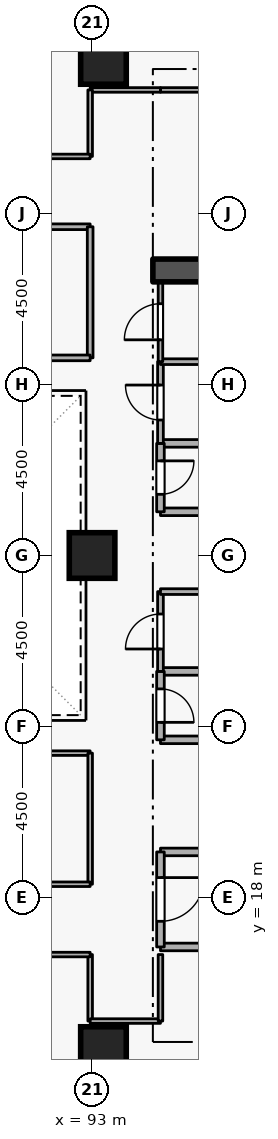
"""IFC4 building model, lengths in metres.
Left out: names, types, materials, properties, quantities, classifications, styles, units other than length and angle.
Written with IfcOpenShell. Run it as: python <this file> out.ifc"""

import sys

from ifc_helpers import new_model, si_unit, direction, frame, frame_2d, origin, origin_2d, place, context, subcontext, project, spatial, rectangle, extrude, element, fill, save


model = new_model("IFC4")
c1 = context("Model", 3, precision=1e-05, world=origin(), true_north=direction((0.0, 1.0)))
c2 = subcontext(c1, "Body", "Model", "MODEL_VIEW")
j1 = project(units=[si_unit("LENGTHUNIT", "METRE"), si_unit("PLANEANGLEUNIT", "RADIAN")], contexts=[c1])
p1 = place(None, origin())
s1 = spatial("IfcSite", under=j1, at=p1, CompositionType="ELEMENT")
p2 = place(p1, origin())
s2 = spatial("IfcBuilding", under=s1, at=p2, CompositionType="ELEMENT")
p3 = place(p2, frame((0.0, 0.0, 112.5)))
s3 = spatial("IfcBuildingStorey", under=s2, at=p3, CompositionType="ELEMENT", Elevation=112.5)
p4 = place(p3, frame((94.6, 34.5, 0.0), z_axis=(0.0, 0.0, 1.0), x_axis=(1.0, 0.0, 0.0)))
e1 = element("IfcWall", 1, at=p4, inside=s3, PredefinedType="SHEAR", context=c2, shape_type="SweptSolid", body=[
    extrude(rectangle(XDim=5.7, YDim=0.6, at=frame_2d((2.85, 0.0))), origin(), (0.0, 0.0, 1.0), 3.6),
])
for number, where, z_axis, x_axis in (
    (2, (93.3, 14.0, 0.0), (0.0, 0.0, 1.0), (1.0, 0.0, 0.0)),
    (3, (93.3, 40.0, 0.0), (0.0, 0.0, 1.0), (1.0, 0.0, 0.0)),
    (4, (93.0, 27.0, 0.0), (0.0, 0.0, 1.0), (1.0, 0.0, 0.0)),
):
    element("IfcColumn", number, at=place(p3, frame(where, z_axis=z_axis, x_axis=x_axis)), inside=s3, PredefinedType="COLUMN", context=c2, shape_type="SweptSolid", body=[
        extrude(rectangle(XDim=1.2, YDim=1.2, at=origin_2d()), origin(), (0.0, 0.0, 1.0), 3.6),
    ])
p5 = place(p3, frame((94.8, 16.7, 0.0), z_axis=(0.0, 0.0, 1.0), x_axis=(1.0, 0.0, 0.0)))
e5 = element("IfcWall", 5, at=p5, inside=s3, PredefinedType="STANDARD", context=c2, shape_type="SweptSolid", body=[
    extrude(rectangle(XDim=5.7, YDim=0.2, at=frame_2d((2.85, 0.0))), origin(), (0.0, 0.0, 1.0), 3.34),
])
p6 = place(p3, frame((97.1, 19.2, 0.0), z_axis=(0.0, 0.0, 1.0), x_axis=(-1.0, 0.0, 0.0)))
e6 = element("IfcWall", 6, at=p6, inside=s3, PredefinedType="STANDARD", context=c2, shape_type="SweptSolid", body=[
    extrude(rectangle(XDim=2.3, YDim=0.2, at=frame_2d((1.15, 0.0))), origin(), (0.0, 0.0, 1.0), 2.545),
])
p7 = place(p3, frame((94.8, 19.2, 0.0), z_axis=(0.0, 0.0, 1.0), x_axis=(0.0, -1.0, 0.0)))
e7 = element("IfcWall", 7, at=p7, inside=s3, PredefinedType="STANDARD", context=c2, shape_type="SweptSolid", body=[
    extrude(rectangle(XDim=2.5, YDim=0.2, at=frame_2d((1.25, 0.0))), origin(), (0.0, 0.0, 1.0), 3.34),
])
p8 = place(p7, frame((0.675, 0.0, 0.0)))
e8 = element("IfcOpeningElement", 8, at=p8, cuts=e7, PredefinedType="OPENING", context=c2, shape_type="SweptSolid", body=[
    extrude(rectangle(XDim=1.15, YDim=2.1, at=frame_2d((0.575, 1.05))), frame((0.0, 0.11, 0.0), z_axis=(0.0, -1.0, 0.0), x_axis=(1.0, 0.0, 0.0)), (0.0, 0.0, 1.0), 0.22),
])
for number, where, z_axis, x_axis in (
    (9, (94.8, 28.15, 0.0), (0.0, 0.0, 1.0), (1.0, 0.0, 0.0)),
    (10, (96.85, 29.95, 0.0), (0.0, 0.0, 1.0), (-1.0, 0.0, 0.0)),
):
    element("IfcWall", number, at=place(p3, frame(where, z_axis=z_axis, x_axis=x_axis)), inside=s3, PredefinedType="STANDARD", context=c2, shape_type="SweptSolid", body=[
        extrude(rectangle(XDim=2.05, YDim=0.2, at=frame_2d((1.025, 0.0))), origin(), (0.0, 0.0, 1.0), 3.34),
    ])
p9 = place(p3, frame((94.8, 29.95, 0.0), z_axis=(0.0, 0.0, 1.0), x_axis=(0.0, -1.0, 0.0)))
e11 = element("IfcWall", 11, at=p9, inside=s3, PredefinedType="STANDARD", context=c2, shape_type="SweptSolid", body=[
    extrude(rectangle(XDim=1.8, YDim=0.2, at=frame_2d((0.9, 0.0))), origin(), (0.0, 0.0, 1.0), 3.34),
])
p10 = place(p9, frame((0.46, 0.0, 0.0)))
e12 = element("IfcOpeningElement", 12, at=p10, cuts=e11, PredefinedType="OPENING", context=c2, shape_type="SweptSolid", body=[
    extrude(rectangle(XDim=0.88, YDim=2.04, at=frame_2d((0.44, 1.02))), frame((0.0, 0.11, 0.0), z_axis=(0.0, -1.0, 0.0), x_axis=(1.0, 0.0, 0.0)), (0.0, 0.0, 1.0), 0.22),
])
for number, where, z_axis, x_axis in (
    (13, (94.8, 22.15, 0.0), (0.0, 0.0, 1.0), (1.0, 0.0, 0.0)),
    (14, (96.85, 23.95, 0.0), (0.0, 0.0, 1.0), (-1.0, 0.0, 0.0)),
):
    element("IfcWall", number, at=place(p3, frame(where, z_axis=z_axis, x_axis=x_axis)), inside=s3, PredefinedType="STANDARD", context=c2, shape_type="SweptSolid", body=[
        extrude(rectangle(XDim=2.05, YDim=0.2, at=frame_2d((1.025, 0.0))), origin(), (0.0, 0.0, 1.0), 3.34),
    ])
p11 = place(p3, frame((94.8, 23.95, 0.0), z_axis=(0.0, 0.0, 1.0), x_axis=(0.0, -1.0, 0.0)))
e15 = element("IfcWall", 15, at=p11, inside=s3, PredefinedType="STANDARD", context=c2, shape_type="SweptSolid", body=[
    extrude(rectangle(XDim=1.8, YDim=0.2, at=frame_2d((0.9, 0.0))), origin(), (0.0, 0.0, 1.0), 3.34),
])
p12 = place(p11, frame((0.46, 0.0, 0.0)))
e16 = element("IfcOpeningElement", 16, at=p12, cuts=e15, PredefinedType="OPENING", context=c2, shape_type="SweptSolid", body=[
    extrude(rectangle(XDim=0.88, YDim=2.04, at=frame_2d((0.44, 1.02))), frame((0.0, 0.11, 0.0), z_axis=(0.0, -1.0, 0.0), x_axis=(1.0, 0.0, 0.0)), (0.0, 0.0, 1.0), 0.22),
])
p13 = place(p3, frame((94.8, 23.95, 0.0), z_axis=(0.0, 0.0, 1.0), x_axis=(0.0, 1.0, 0.0)))
e17 = element("IfcWall", 17, at=p13, inside=s3, PredefinedType="PARTITIONING", context=c2, shape_type="SweptSolid", body=[
    extrude(rectangle(XDim=2.1, YDim=0.15, at=frame_2d((1.05, 0.0))), origin(), (0.0, 0.0, 1.0), 3.34),
])
p14 = place(p13, frame((0.59, 0.0, 0.0)))
e18 = element("IfcOpeningElement", 18, at=p14, cuts=e17, PredefinedType="OPENING", context=c2, shape_type="SweptSolid", body=[
    extrude(rectangle(XDim=0.92, YDim=2.08, at=frame_2d((0.46, 1.04))), frame((0.0, 0.085, 0.0), z_axis=(0.0, -1.0, 0.0), x_axis=(1.0, 0.0, 0.0)), (0.0, 0.0, 1.0), 0.17),
])
p15 = place(p3, frame((94.8, 26.05, 0.0), z_axis=(0.0, 0.0, 1.0), x_axis=(1.0, 0.0, 0.0)))
e19 = element("IfcWall", 19, at=p15, inside=s3, PredefinedType="PARTITIONING", context=c2, shape_type="SweptSolid", body=[
    extrude(rectangle(XDim=2.05, YDim=0.15, at=frame_2d((1.025, 0.0))), origin(), (0.0, 0.0, 1.0), 3.34),
])
p16 = place(p3, frame((94.8, 29.95, 0.0), z_axis=(0.0, 0.0, 1.0), x_axis=(0.0, 1.0, 0.0)))
e20 = element("IfcWall", 20, at=p16, inside=s3, PredefinedType="PARTITIONING", context=c2, shape_type="SweptSolid", body=[
    extrude(rectangle(XDim=2.15, YDim=0.15, at=frame_2d((1.075, 0.0))), origin(), (0.0, 0.0, 1.0), 3.34),
])
p17 = place(p16, frame((0.615, 0.0, 0.0)))
e21 = element("IfcOpeningElement", 21, at=p17, cuts=e20, PredefinedType="OPENING", context=c2, shape_type="SweptSolid", body=[
    extrude(rectangle(XDim=0.92, YDim=2.08, at=frame_2d((0.46, 1.04))), frame((0.0, 0.085, 0.0), z_axis=(0.0, -1.0, 0.0), x_axis=(1.0, 0.0, 0.0)), (0.0, 0.0, 1.0), 0.17),
])
p18 = place(p3, frame((94.8, 32.1, 0.0), z_axis=(0.0, 0.0, 1.0), x_axis=(1.0, 0.0, 0.0)))
e22 = element("IfcWall", 22, at=p18, inside=s3, PredefinedType="PARTITIONING", context=c2, shape_type="SweptSolid", body=[
    extrude(rectangle(XDim=2.05, YDim=0.15, at=frame_2d((1.025, 0.0))), origin(), (0.0, 0.0, 1.0), 3.34),
])
p19 = place(p3, frame((94.8, 32.1, 0.0), z_axis=(0.0, 0.0, 1.0), x_axis=(0.0, 1.0, 0.0)))
e23 = element("IfcWall", 23, at=p19, inside=s3, PredefinedType="PARTITIONING", context=c2, shape_type="SweptSolid", body=[
    extrude(rectangle(XDim=2.1, YDim=0.12, at=frame_2d((1.05, 0.0))), origin(), (0.0, 0.0, 1.0), 3.34),
])
p20 = place(p19, frame((0.575, 0.0, 0.0)))
e24 = element("IfcOpeningElement", 24, at=p20, cuts=e23, PredefinedType="OPENING", context=c2, shape_type="SweptSolid", body=[
    extrude(rectangle(XDim=0.95, YDim=2.1, at=frame_2d((0.475, 1.05))), frame((0.0, 0.07, 0.0), z_axis=(0.0, -1.0, 0.0), x_axis=(1.0, 0.0, 0.0)), (0.0, 0.0, 1.0), 0.14),
])
p21 = place(p3, frame((92.95, 16.5, 0.0), z_axis=(0.0, 0.0, 1.0), x_axis=(0.0, -1.0, 0.0)))
e25 = element("IfcWall", 25, at=p21, inside=s3, PredefinedType="PARTITIONING", context=c2, shape_type="SweptSolid", body=[
    extrude(rectangle(XDim=1.75, YDim=0.12, at=frame_2d((0.875, 0.0))), origin(), (0.0, 0.0, 1.0), 3.34),
])
p22 = place(p3, frame((92.95, 14.75, 0.0), z_axis=(0.0, 0.0, 1.0), x_axis=(1.0, 0.0, 0.0)))
e26 = element("IfcWall", 26, at=p22, inside=s3, PredefinedType="PARTITIONING", context=c2, shape_type="SweptSolid", body=[
    extrude(rectangle(XDim=1.85, YDim=0.12, at=frame_2d((0.925, 0.0))), origin(), (0.0, 0.0, 1.0), 3.34),
])
p23 = place(p3, frame((94.8, 14.75, 0.0), z_axis=(0.0, 0.0, 1.0), x_axis=(0.0, 1.0, 0.0)))
e27 = element("IfcWall", 27, at=p23, inside=s3, PredefinedType="PARTITIONING", context=c2, shape_type="SweptSolid", body=[
    extrude(rectangle(XDim=1.75, YDim=0.12, at=frame_2d((0.875, 0.0))), origin(), (0.0, 0.0, 1.0), 3.34),
])
p24 = place(p3, frame((88.5, 16.5, 0.0), z_axis=(0.0, 0.0, 1.0), x_axis=(1.0, 0.0, 0.0)))
e28 = element("IfcWall", 28, at=p24, inside=s3, PredefinedType="PARTITIONING", context=c2, shape_type="SweptSolid", body=[
    extrude(rectangle(XDim=4.45, YDim=0.12, at=frame_2d((2.225, 0.0))), origin(), (0.0, 0.0, 1.0), 3.34),
])
p25 = place(p24, frame((1.7, 0.0, 0.0)))
e29 = element("IfcOpeningElement", 29, at=p25, cuts=e28, PredefinedType="OPENING", context=c2, shape_type="SweptSolid", body=[
    extrude(rectangle(XDim=1.05, YDim=2.1, at=frame_2d((0.525, 1.05))), frame((0.0, 0.07, 0.0), z_axis=(0.0, -1.0, 0.0), x_axis=(1.0, 0.0, 0.0)), (0.0, 0.0, 1.0), 0.14),
])
p26 = place(p3, frame((97.95, 39.25, 0.0), z_axis=(0.0, 0.0, 1.0), x_axis=(-1.0, 0.0, 0.0)))
e30 = element("IfcWall", 30, at=p26, inside=s3, PredefinedType="PARTITIONING", context=c2, shape_type="SweptSolid", body=[
    extrude(rectangle(XDim=3.15, YDim=0.12, at=frame_2d((1.575, 0.0))), origin(), (0.0, 0.0, 1.0), 3.34),
])
p27 = place(p3, frame((94.8, 39.25, 0.0), z_axis=(0.0, 0.0, 1.0), x_axis=(-1.0, 0.0, 0.0)))
e31 = element("IfcWall", 31, at=p27, inside=s3, PredefinedType="PARTITIONING", context=c2, shape_type="SweptSolid", body=[
    extrude(rectangle(XDim=1.85, YDim=0.12, at=frame_2d((0.925, 0.0))), origin(), (0.0, 0.0, 1.0), 3.34),
])
p28 = place(p3, frame((92.95, 39.25, 0.0), z_axis=(0.0, 0.0, 1.0), x_axis=(0.0, -1.0, 0.0)))
e32 = element("IfcWall", 32, at=p28, inside=s3, PredefinedType="PARTITIONING", context=c2, shape_type="SweptSolid", body=[
    extrude(rectangle(XDim=1.75, YDim=0.12, at=frame_2d((0.875, 0.0))), origin(), (0.0, 0.0, 1.0), 3.34),
])
p29 = place(p3, frame((92.95, 37.5, 0.0), z_axis=(0.0, 0.0, 1.0), x_axis=(-1.0, 0.0, 0.0)))
e33 = element("IfcWall", 33, at=p29, inside=s3, PredefinedType="PARTITIONING", context=c2, shape_type="SweptSolid", body=[
    extrude(rectangle(XDim=4.45, YDim=0.12, at=frame_2d((2.225, 0.0))), origin(), (0.0, 0.0, 1.0), 3.34),
])
p30 = place(p29, frame((1.7, 0.0, 0.0)))
e34 = element("IfcOpeningElement", 34, at=p30, cuts=e33, PredefinedType="OPENING", context=c2, shape_type="SweptSolid", body=[
    extrude(rectangle(XDim=1.05, YDim=2.1, at=frame_2d((0.525, 1.05))), frame((0.0, 0.07, 0.0), z_axis=(0.0, -1.0, 0.0), x_axis=(1.0, 0.0, 0.0)), (0.0, 0.0, 1.0), 0.14),
])
p31 = place(p3, frame((84.05, 35.65, 0.0), z_axis=(0.0, 0.0, 1.0), x_axis=(1.0, 0.0, 0.0)))
e35 = element("IfcWall", 35, at=p31, inside=s3, PredefinedType="PARTITIONING", context=c2, shape_type="SweptSolid", body=[
    extrude(rectangle(XDim=8.9, YDim=0.15, at=frame_2d((4.45, 0.0))), origin(), (0.0, 0.0, 1.0), 3.34),
])
p32 = place(p31, frame((3.8, 0.0, 0.0)))
e36 = element("IfcOpeningElement", 36, at=p32, cuts=e35, PredefinedType="OPENING", context=c2, shape_type="SweptSolid", body=[
    extrude(rectangle(XDim=1.3, YDim=2.12, at=frame_2d((0.65, 1.06))), frame((0.0, 0.085, 0.0), z_axis=(0.0, -1.0, 0.0), x_axis=(1.0, 0.0, 0.0)), (0.0, 0.0, 1.0), 0.17),
])
p33 = place(p3, frame((92.95, 35.65, 0.0), z_axis=(0.0, 0.0, 1.0), x_axis=(0.0, -1.0, 0.0)))
e37 = element("IfcWall", 37, at=p33, inside=s3, PredefinedType="PARTITIONING", context=c2, shape_type="SweptSolid", body=[
    extrude(rectangle(XDim=3.45, YDim=0.15, at=frame_2d((1.725, 0.0))), origin(), (0.0, 0.0, 1.0), 3.34),
])
p34 = place(p3, frame((92.95, 32.2, 0.0), z_axis=(0.0, 0.0, 1.0), x_axis=(-1.0, 0.0, 0.0)))
e38 = element("IfcWall", 38, at=p34, inside=s3, PredefinedType="PARTITIONING", context=c2, shape_type="SweptSolid", body=[
    extrude(rectangle(XDim=8.9, YDim=0.15, at=frame_2d((4.45, 0.0))), origin(), (0.0, 0.0, 1.0), 3.34),
])
p35 = place(p3, frame((84.05, 21.8, 0.0), z_axis=(0.0, 0.0, 1.0), x_axis=(1.0, 0.0, 0.0)))
e39 = element("IfcWall", 39, at=p35, inside=s3, PredefinedType="PARTITIONING", context=c2, shape_type="SweptSolid", body=[
    extrude(rectangle(XDim=8.9, YDim=0.12, at=frame_2d((4.45, 0.0))), origin(), (0.0, 0.0, 1.0), 3.34),
])
p36 = place(p3, frame((92.95, 21.8, 0.0), z_axis=(0.0, 0.0, 1.0), x_axis=(0.0, -1.0, 0.0)))
e40 = element("IfcWall", 40, at=p36, inside=s3, PredefinedType="PARTITIONING", context=c2, shape_type="SweptSolid", body=[
    extrude(rectangle(XDim=3.45, YDim=0.12, at=frame_2d((1.725, 0.0))), origin(), (0.0, 0.0, 1.0), 3.34),
])
p37 = place(p3, frame((92.95, 18.35, 0.0), z_axis=(0.0, 0.0, 1.0), x_axis=(-1.0, 0.0, 0.0)))
e41 = element("IfcWall", 41, at=p37, inside=s3, PredefinedType="PARTITIONING", context=c2, shape_type="SweptSolid", body=[
    extrude(rectangle(XDim=8.9, YDim=0.12, at=frame_2d((4.45, 0.0))), origin(), (0.0, 0.0, 1.0), 3.34),
])
p38 = place(p37, frame((3.975, 0.0, 0.0)))
e42 = element("IfcOpeningElement", 42, at=p38, cuts=e41, PredefinedType="OPENING", context=c2, shape_type="SweptSolid", body=[
    extrude(rectangle(XDim=0.95, YDim=2.1, at=frame_2d((0.475, 1.05))), frame((0.0, 0.07, 0.0), z_axis=(0.0, -1.0, 0.0), x_axis=(1.0, 0.0, 0.0)), (0.0, 0.0, 1.0), 0.14),
])
p39 = place(p8, origin())
e43 = element("IfcDoor", 43, at=p39, inside=s3, OperationType="SINGLE_SWING_LEFT", PredefinedType="DOOR", context=c2, shape_type="SweptSolid", body=[
    extrude(rectangle(XDim=1.15, YDim=2.1, at=frame_2d((0.575, 1.05))), frame((0.0, 0.025, 0.0), z_axis=(0.0, -1.0, 0.0), x_axis=(1.0, 0.0, 0.0)), (0.0, 0.0, 1.0), 0.05),
])
fill(e8, e43)
p40 = place(p10, origin())
e44 = element("IfcDoor", 44, at=p40, inside=s3, OperationType="SINGLE_SWING_LEFT", PredefinedType="DOOR", context=c2, shape_type="SweptSolid", body=[
    extrude(rectangle(XDim=0.88, YDim=2.04, at=frame_2d((0.44, 1.02))), frame((0.0, 0.025, 0.0), z_axis=(0.0, -1.0, 0.0), x_axis=(1.0, 0.0, 0.0)), (0.0, 0.0, 1.0), 0.05),
])
fill(e12, e44)
p41 = place(p12, origin())
e45 = element("IfcDoor", 45, at=p41, inside=s3, OperationType="SINGLE_SWING_RIGHT", PredefinedType="DOOR", context=c2, shape_type="SweptSolid", body=[
    extrude(rectangle(XDim=0.88, YDim=2.04, at=frame_2d((0.44, 1.02))), frame((0.0, 0.025, 0.0), z_axis=(0.0, -1.0, 0.0), x_axis=(1.0, 0.0, 0.0)), (0.0, 0.0, 1.0), 0.05),
])
fill(e16, e45)
p42 = place(p14, origin())
e46 = element("IfcDoor", 46, at=p42, inside=s3, OperationType="SINGLE_SWING_LEFT", PredefinedType="DOOR", context=c2, shape_type="SweptSolid", body=[
    extrude(rectangle(XDim=0.92, YDim=2.08, at=frame_2d((0.46, 1.04))), frame((0.0, 0.025, 0.0), z_axis=(0.0, -1.0, 0.0), x_axis=(1.0, 0.0, 0.0)), (0.0, 0.0, 1.0), 0.05),
])
fill(e18, e46)
p43 = place(p17, origin())
e47 = element("IfcDoor", 47, at=p43, inside=s3, OperationType="SINGLE_SWING_RIGHT", PredefinedType="DOOR", context=c2, shape_type="SweptSolid", body=[
    extrude(rectangle(XDim=0.92, YDim=2.08, at=frame_2d((0.46, 1.04))), frame((0.0, 0.025, 0.0), z_axis=(0.0, -1.0, 0.0), x_axis=(1.0, 0.0, 0.0)), (0.0, 0.0, 1.0), 0.05),
])
fill(e21, e47)
p44 = place(p20, origin())
e48 = element("IfcDoor", 48, at=p44, inside=s3, OperationType="SINGLE_SWING_LEFT", PredefinedType="DOOR", context=c2, shape_type="SweptSolid", body=[
    extrude(rectangle(XDim=0.95, YDim=2.1, at=frame_2d((0.475, 1.05))), frame((0.0, 0.025, 0.0), z_axis=(0.0, -1.0, 0.0), x_axis=(1.0, 0.0, 0.0)), (0.0, 0.0, 1.0), 0.05),
])
fill(e24, e48)
save(model, sys.argv[1])
